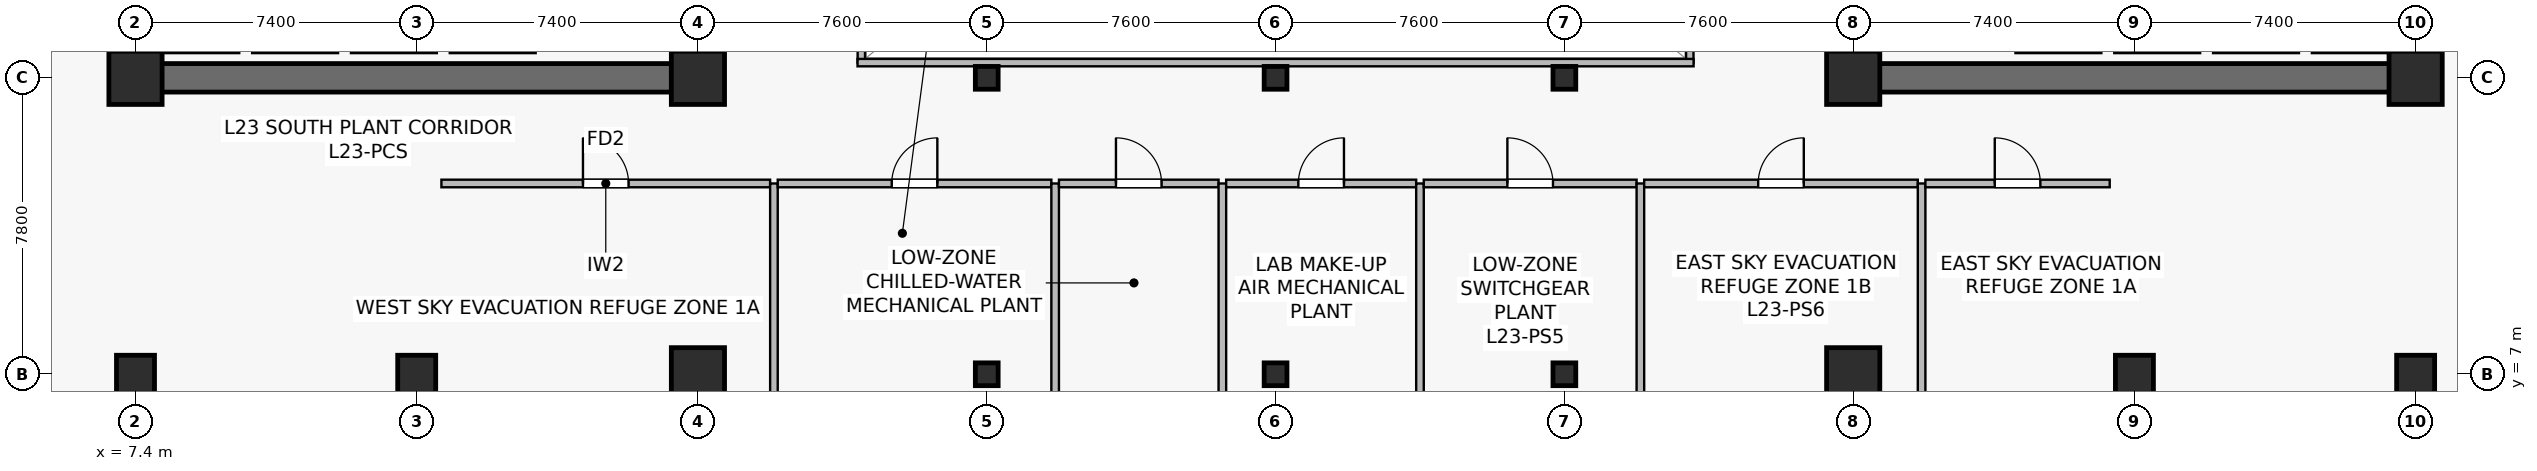
"""IFC4 building model, lengths in metres.
Left out: names, types, materials, properties, quantities, classifications, styles, units other than length and angle.
Written with IfcOpenShell. Run it as: python <this file> out.ifc"""

import sys

from ifc_helpers import new_model, si_unit, direction, frame, frame_2d, origin, origin_2d, place, context, subcontext, project, spatial, rectangle, hollow_rectangle, extrude, source, transform, mapped, element, fill, save


model = new_model("IFC4")
c1 = context("Model", 3, precision=1e-05, world=origin(), true_north=direction((0.0, 1.0)))
c2 = subcontext(c1, "Body", "Model", "MODEL_VIEW")
j1 = project(units=[si_unit("LENGTHUNIT", "METRE"), si_unit("PLANEANGLEUNIT", "RADIAN")], contexts=[c1])
p1 = place(None, origin())
s1 = spatial("IfcSite", under=j1, at=p1, CompositionType="ELEMENT")
p2 = place(p1, origin())
s2 = spatial("IfcBuilding", under=s1, at=p2, CompositionType="ELEMENT")
p3 = place(p2, frame((0.0, 0.0, 94.9)))
s3 = spatial("IfcBuildingStorey", under=s2, at=p3, CompositionType="ELEMENT", Elevation=94.9)
p4 = place(p3, frame((7.025, 14.8, 0.0), z_axis=(0.0, 0.0, 1.0), x_axis=(1.0, 0.0, 0.0)))
e1 = element("IfcWall", 1, at=p4, inside=s3, PredefinedType="SHEAR", context=c2, shape_type="SweptSolid", body=[
    extrude(rectangle(XDim=15.55, YDim=0.75, at=frame_2d((7.775, 0.0))), origin(), (0.0, 0.0, 1.0), 5.09),
])
p5 = place(p3, frame((7.4, 15.175, 0.0), z_axis=(0.0, 0.0, 1.0), x_axis=(0.0, 1.0, 0.0)))
e2 = element("IfcWall", 2, at=p5, inside=s3, PredefinedType="SHEAR", context=c2, shape_type="SweptSolid", body=[
    extrude(rectangle(XDim=18.25, YDim=0.75, at=frame_2d((9.125, 0.0))), origin(), (0.0, 0.0, 1.0), 5.09),
])
p6 = place(p3, frame((22.2, 15.175, 0.0), z_axis=(0.0, 0.0, 1.0), x_axis=(0.0, 1.0, 0.0)))
e3 = element("IfcWall", 3, at=p6, inside=s3, PredefinedType="SHEAR", context=c2, shape_type="SweptSolid", body=[
    extrude(rectangle(XDim=18.25, YDim=0.75, at=frame_2d((9.125, 0.0))), origin(), (0.0, 0.0, 1.0), 5.09),
])
p7 = place(p6, frame((3.375, 0.0, 0.0)))
e4 = element("IfcOpeningElement", 4, at=p7, cuts=e3, PredefinedType="OPENING", context=c2, shape_type="SweptSolid", body=[
    extrude(rectangle(XDim=1.42, YDim=2.2, at=frame_2d((0.71, 1.1))), frame((0.0, 0.385, 0.0), z_axis=(0.0, -1.0, 0.0), x_axis=(1.0, 0.0, 0.0)), (0.0, 0.0, 1.0), 0.77),
])
p8 = place(p3, frame((52.225, 14.8, 0.0), z_axis=(0.0, 0.0, 1.0), x_axis=(1.0, 0.0, 0.0)))
e5 = element("IfcWall", 5, at=p8, inside=s3, PredefinedType="SHEAR", context=c2, shape_type="SweptSolid", body=[
    extrude(rectangle(XDim=15.55, YDim=0.75, at=frame_2d((7.775, 0.0))), origin(), (0.0, 0.0, 1.0), 5.09),
])
p9 = place(p3, frame((52.6, 15.175, 0.0), z_axis=(0.0, 0.0, 1.0), x_axis=(0.0, 1.0, 0.0)))
e6 = element("IfcWall", 6, at=p9, inside=s3, PredefinedType="SHEAR", context=c2, shape_type="SweptSolid", body=[
    extrude(rectangle(XDim=18.25, YDim=0.75, at=frame_2d((9.125, 0.0))), origin(), (0.0, 0.0, 1.0), 5.09),
])
p10 = place(p9, frame((3.375, 0.0, 0.0)))
e7 = element("IfcOpeningElement", 7, at=p10, cuts=e6, PredefinedType="OPENING", context=c2, shape_type="SweptSolid", body=[
    extrude(rectangle(XDim=1.42, YDim=2.2, at=frame_2d((0.71, 1.1))), frame((0.0, 0.385, 0.0), z_axis=(0.0, -1.0, 0.0), x_axis=(1.0, 0.0, 0.0)), (0.0, 0.0, 1.0), 0.77),
])
p11 = place(p3, frame((67.4, 15.175, 0.0), z_axis=(0.0, 0.0, 1.0), x_axis=(0.0, 1.0, 0.0)))
e8 = element("IfcWall", 8, at=p11, inside=s3, PredefinedType="SHEAR", context=c2, shape_type="SweptSolid", body=[
    extrude(rectangle(XDim=18.25, YDim=0.75, at=frame_2d((9.125, 0.0))), origin(), (0.0, 0.0, 1.0), 5.09),
])
m1 = source(origin(), c2, "Body", "SweptSolid", [
    extrude(rectangle(XDim=1.0, YDim=1.0, at=origin_2d()), origin(), (0.0, 0.0, 1.0), 5.4),
])
p12 = place(p3, frame((14.8, 7.0, 0.0), z_axis=(0.0, 0.0, 1.0), x_axis=(1.0, 0.0, 0.0)))
e9 = element("IfcColumn", 9, at=p12, inside=s3, PredefinedType="COLUMN", context=c2, shape_type="MappedRepresentation", body=[
    mapped(m1, transform((0.0, 0.0, 0.0), scale=1.0)),
])
m2 = source(origin(), c2, "Body", "SweptSolid", [
    extrude(rectangle(XDim=1.4, YDim=1.4, at=origin_2d()), origin(), (0.0, 0.0, 1.0), 5.4),
])
for number, where, z_axis, x_axis in (
    (10, (22.2, 7.0, 0.0), (0.0, 0.0, 1.0), (1.0, 0.0, 0.0)),
    (11, (7.4, 14.8, 0.0), (0.0, 0.0, 1.0), (1.0, 0.0, 0.0)),
    (12, (22.2, 14.8, 0.0), (0.0, 0.0, 1.0), (1.0, 0.0, 0.0)),
    (13, (52.6, 7.0, 0.0), (0.0, 0.0, 1.0), (1.0, 0.0, 0.0)),
):
    element("IfcColumn", number, at=place(p3, frame(where, z_axis=z_axis, x_axis=x_axis)), inside=s3, PredefinedType="COLUMN", context=c2, shape_type="MappedRepresentation", body=[
        mapped(m2, transform((0.0, 0.0, 0.0), scale=1.0)),
    ])
p13 = place(p3, frame((60.0, 7.0, 0.0), z_axis=(0.0, 0.0, 1.0), x_axis=(1.0, 0.0, 0.0)))
e14 = element("IfcColumn", 14, at=p13, inside=s3, PredefinedType="COLUMN", context=c2, shape_type="MappedRepresentation", body=[
    mapped(m1, transform((0.0, 0.0, 0.0), scale=1.0)),
])
for number, where, z_axis, x_axis in (
    (15, (52.6, 14.8, 0.0), (0.0, 0.0, 1.0), (1.0, 0.0, 0.0)),
    (16, (67.4, 14.8, 0.0), (0.0, 0.0, 1.0), (1.0, 0.0, 0.0)),
):
    element("IfcColumn", number, at=place(p3, frame(where, z_axis=z_axis, x_axis=x_axis)), inside=s3, PredefinedType="COLUMN", context=c2, shape_type="MappedRepresentation", body=[
        mapped(m2, transform((0.0, 0.0, 0.0), scale=1.0)),
    ])
for number, where, z_axis, x_axis in (
    (17, (7.4, 7.0, 0.0), (0.0, 0.0, 1.0), (1.0, 0.0, 0.0)),
    (18, (67.4, 7.0, 0.0), (0.0, 0.0, 1.0), (1.0, 0.0, 0.0)),
):
    element("IfcColumn", number, at=place(p3, frame(where, z_axis=z_axis, x_axis=x_axis)), inside=s3, PredefinedType="COLUMN", context=c2, shape_type="MappedRepresentation", body=[
        mapped(m1, transform((0.0, 0.0, 0.0), scale=1.0)),
    ])
m3 = source(origin(), c2, "Body", "SweptSolid", [
    extrude(hollow_rectangle(XDim=0.6, YDim=0.6, WallThickness=0.028, at=origin_2d()), origin(), (0.0, 0.0, 1.0), 5.4),
])
for number, where, z_axis, x_axis in (
    (19, (29.8, 7.0, 0.0), (0.0, 0.0, 1.0), (1.0, 0.0, 0.0)),
    (20, (29.8, 14.8, 0.0), (0.0, 0.0, 1.0), (1.0, 0.0, 0.0)),
    (21, (37.4, 7.0, 0.0), (0.0, 0.0, 1.0), (1.0, 0.0, 0.0)),
    (22, (37.4, 14.8, 0.0), (0.0, 0.0, 1.0), (1.0, 0.0, 0.0)),
    (23, (45.0, 7.0, 0.0), (0.0, 0.0, 1.0), (1.0, 0.0, 0.0)),
    (24, (45.0, 14.8, 0.0), (0.0, 0.0, 1.0), (1.0, 0.0, 0.0)),
):
    element("IfcColumn", number, at=place(p3, frame(where, z_axis=z_axis, x_axis=x_axis)), inside=s3, PredefinedType="COLUMN", context=c2, shape_type="MappedRepresentation", body=[
        mapped(m3, transform((0.0, 0.0, 0.0), scale=1.0)),
    ])
p14 = place(p3, frame((7.87, 15.55, 0.0), z_axis=(0.0, 0.0, 1.0), x_axis=(1.0, 0.0, 0.0)))
e25 = element("IfcWall", 25, at=p14, inside=s3, PredefinedType="SOLIDWALL", context=c2, shape_type="SweptSolid", body=[
    extrude(rectangle(XDim=2.26, YDim=0.2, at=frame_2d((1.13, 0.0))), origin(), (0.0, 0.0, 1.0), 5.09),
])
p15 = place(p3, frame((10.47, 15.55, 0.0), z_axis=(0.0, 0.0, 1.0), x_axis=(1.0, 0.0, 0.0)))
e26 = element("IfcWall", 26, at=p15, inside=s3, PredefinedType="SOLIDWALL", context=c2, shape_type="SweptSolid", body=[
    extrude(rectangle(XDim=2.26, YDim=0.2, at=frame_2d((1.13, 0.0))), origin(), (0.0, 0.0, 1.0), 5.09),
])
p16 = place(p3, frame((13.07, 15.55, 0.0), z_axis=(0.0, 0.0, 1.0), x_axis=(1.0, 0.0, 0.0)))
e27 = element("IfcWall", 27, at=p16, inside=s3, PredefinedType="SOLIDWALL", context=c2, shape_type="SweptSolid", body=[
    extrude(rectangle(XDim=2.26, YDim=0.2, at=frame_2d((1.13, 0.0))), origin(), (0.0, 0.0, 1.0), 4.425),
])
for number, where, z_axis, x_axis in (
    (28, (15.67, 15.55, 0.0), (0.0, 0.0, 1.0), (1.0, 0.0, 0.0)),
    (29, (64.67, 15.55, 0.0), (0.0, 0.0, 1.0), (1.0, 0.0, 0.0)),
    (30, (62.07, 15.55, 0.0), (0.0, 0.0, 1.0), (1.0, 0.0, 0.0)),
):
    element("IfcWall", number, at=place(p3, frame(where, z_axis=z_axis, x_axis=x_axis)), inside=s3, PredefinedType="SOLIDWALL", context=c2, shape_type="SweptSolid", body=[
        extrude(rectangle(XDim=2.26, YDim=0.2, at=frame_2d((1.13, 0.0))), origin(), (0.0, 0.0, 1.0), 5.09),
    ])
p17 = place(p3, frame((59.47, 15.55, 0.0), z_axis=(0.0, 0.0, 1.0), x_axis=(1.0, 0.0, 0.0)))
e31 = element("IfcWall", 31, at=p17, inside=s3, PredefinedType="SOLIDWALL", context=c2, shape_type="SweptSolid", body=[
    extrude(rectangle(XDim=2.26, YDim=0.2, at=frame_2d((1.13, 0.0))), origin(), (0.0, 0.0, 1.0), 4.425),
])
p18 = place(p3, frame((56.87, 15.55, 0.0), z_axis=(0.0, 0.0, 1.0), x_axis=(1.0, 0.0, 0.0)))
e32 = element("IfcWall", 32, at=p18, inside=s3, PredefinedType="SOLIDWALL", context=c2, shape_type="SweptSolid", body=[
    extrude(rectangle(XDim=2.26, YDim=0.2, at=frame_2d((1.13, 0.0))), origin(), (0.0, 0.0, 1.0), 5.09),
])
p19 = place(p3, frame((26.5, 15.2, 0.0), z_axis=(0.0, 0.0, 1.0), x_axis=(0.0, 1.0, 0.0)))
e33 = element("IfcWall", 33, at=p19, inside=s3, PredefinedType="SOLIDWALL", context=c2, shape_type="SweptSolid", body=[
    extrude(rectangle(XDim=18.2, YDim=0.195, at=frame_2d((9.1, 0.0))), origin(), (0.0, 0.0, 1.0), 5.09),
])
p20 = place(p19, frame((1.8, 0.0, 0.9)))
e34 = element("IfcOpeningElement", 34, at=p20, cuts=e33, PredefinedType="OPENING", context=c2, shape_type="SweptSolid", body=[
    extrude(rectangle(XDim=1.2, YDim=1.35, at=frame_2d((0.6, 0.675))), frame((0.0, 0.107, 0.0), z_axis=(0.0, -1.0, 0.0), x_axis=(1.0, 0.0, 0.0)), (0.0, 0.0, 1.0), 0.215),
])
p21 = place(p19, frame((13.2, 0.0, 0.9)))
e35 = element("IfcOpeningElement", 35, at=p21, cuts=e33, PredefinedType="OPENING", context=c2, shape_type="SweptSolid", body=[
    extrude(rectangle(XDim=1.2, YDim=1.35, at=frame_2d((0.6, 0.675))), frame((0.0, 0.107, 0.0), z_axis=(0.0, -1.0, 0.0), x_axis=(1.0, 0.0, 0.0)), (0.0, 0.0, 1.0), 0.215),
])
p22 = place(p3, frame((48.3, 15.2, 0.0), z_axis=(0.0, 0.0, 1.0), x_axis=(0.0, 1.0, 0.0)))
e36 = element("IfcWall", 36, at=p22, inside=s3, PredefinedType="SOLIDWALL", context=c2, shape_type="SweptSolid", body=[
    extrude(rectangle(XDim=18.2, YDim=0.195, at=frame_2d((9.1, 0.0))), origin(), (0.0, 0.0, 1.0), 5.09),
])
p23 = place(p22, frame((1.8, 0.0, 0.9)))
e37 = element("IfcOpeningElement", 37, at=p23, cuts=e36, PredefinedType="OPENING", context=c2, shape_type="SweptSolid", body=[
    extrude(rectangle(XDim=1.2, YDim=1.35, at=frame_2d((0.6, 0.675))), frame((0.0, 0.107, 0.0), z_axis=(0.0, -1.0, 0.0), x_axis=(1.0, 0.0, 0.0)), (0.0, 0.0, 1.0), 0.215),
])
p24 = place(p22, frame((13.2, 0.0, 0.9)))
e38 = element("IfcOpeningElement", 38, at=p24, cuts=e36, PredefinedType="OPENING", context=c2, shape_type="SweptSolid", body=[
    extrude(rectangle(XDim=1.2, YDim=1.35, at=frame_2d((0.6, 0.675))), frame((0.0, 0.107, 0.0), z_axis=(0.0, -1.0, 0.0), x_axis=(1.0, 0.0, 0.0)), (0.0, 0.0, 1.0), 0.215),
])
p25 = place(p3, frame((26.4, 15.2, 0.0), z_axis=(0.0, 0.0, 1.0), x_axis=(1.0, 0.0, 0.0)))
e39 = element("IfcWall", 39, at=p25, inside=s3, PredefinedType="SOLIDWALL", context=c2, shape_type="SweptSolid", body=[
    extrude(rectangle(XDim=22.0, YDim=0.195, at=frame_2d((11.0, 0.0))), origin(), (0.0, 0.0, 1.0), 5.09),
])
p26 = place(p3, frame((15.45, 12.02, 0.0), z_axis=(0.0, 0.0, 1.0), x_axis=(1.0, 0.0, 0.0)))
e40 = element("IfcWall", 40, at=p26, inside=s3, PredefinedType="SOLIDWALL", context=c2, shape_type="SweptSolid", body=[
    extrude(rectangle(XDim=8.65, YDim=0.2, at=frame_2d((4.325, 0.0))), origin(), (0.0, 0.0, 1.0), 4.425),
])
p27 = place(p26, frame((3.725, 0.0, 0.0)))
e41 = element("IfcOpeningElement", 41, at=p27, cuts=e40, PredefinedType="OPENING", context=c2, shape_type="SweptSolid", body=[
    extrude(rectangle(XDim=1.2, YDim=2.16, at=frame_2d((0.6, 1.08))), frame((0.0, 0.11, 0.0), z_axis=(0.0, -1.0, 0.0), x_axis=(1.0, 0.0, 0.0)), (0.0, 0.0, 1.0), 0.22),
])
p28 = place(p3, frame((24.2, 0.11, 0.0), z_axis=(0.0, 0.0, 1.0), x_axis=(0.0, 1.0, 0.0)))
e42 = element("IfcWall", 42, at=p28, inside=s3, PredefinedType="SOLIDWALL", context=c2, shape_type="SweptSolid", body=[
    extrude(rectangle(XDim=11.91, YDim=0.2, at=frame_2d((5.955, 0.0))), origin(), (0.0, 0.0, 1.0), 4.325),
])
p29 = place(p3, frame((24.3, 12.02, 0.0), z_axis=(0.0, 0.0, 1.0), x_axis=(1.0, 0.0, 0.0)))
e43 = element("IfcWall", 43, at=p29, inside=s3, PredefinedType="SOLIDWALL", context=c2, shape_type="SweptSolid", body=[
    extrude(rectangle(XDim=7.2, YDim=0.2, at=frame_2d((3.6, 0.0))), origin(), (0.0, 0.0, 1.0), 4.425),
])
p30 = place(p29, frame((3.0, 0.0, 0.0)))
e44 = element("IfcOpeningElement", 44, at=p30, cuts=e43, PredefinedType="OPENING", context=c2, shape_type="SweptSolid", body=[
    extrude(rectangle(XDim=1.2, YDim=2.16, at=frame_2d((0.6, 1.08))), frame((0.0, 0.11, 0.0), z_axis=(0.0, -1.0, 0.0), x_axis=(1.0, 0.0, 0.0)), (0.0, 0.0, 1.0), 0.22),
])
p31 = place(p3, frame((31.6, 0.11, 0.0), z_axis=(0.0, 0.0, 1.0), x_axis=(0.0, 1.0, 0.0)))
e45 = element("IfcWall", 45, at=p31, inside=s3, PredefinedType="SOLIDWALL", context=c2, shape_type="SweptSolid", body=[
    extrude(rectangle(XDim=11.91, YDim=0.2, at=frame_2d((5.955, 0.0))), origin(), (0.0, 0.0, 1.0), 4.325),
])
p32 = place(p3, frame((31.7, 12.02, 0.0), z_axis=(0.0, 0.0, 1.0), x_axis=(1.0, 0.0, 0.0)))
e46 = element("IfcWall", 46, at=p32, inside=s3, PredefinedType="SOLIDWALL", context=c2, shape_type="SweptSolid", body=[
    extrude(rectangle(XDim=4.2, YDim=0.2, at=frame_2d((2.1, 0.0))), origin(), (0.0, 0.0, 1.0), 4.725),
])
p33 = place(p32, frame((1.5, 0.0, 0.0)))
e47 = element("IfcOpeningElement", 47, at=p33, cuts=e46, PredefinedType="OPENING", context=c2, shape_type="SweptSolid", body=[
    extrude(rectangle(XDim=1.2, YDim=2.16, at=frame_2d((0.6, 1.08))), frame((0.0, 0.11, 0.0), z_axis=(0.0, -1.0, 0.0), x_axis=(1.0, 0.0, 0.0)), (0.0, 0.0, 1.0), 0.22),
])
p34 = place(p3, frame((36.0, 0.11, 0.0), z_axis=(0.0, 0.0, 1.0), x_axis=(0.0, 1.0, 0.0)))
e48 = element("IfcWall", 48, at=p34, inside=s3, PredefinedType="SOLIDWALL", context=c2, shape_type="SweptSolid", body=[
    extrude(rectangle(XDim=11.91, YDim=0.2, at=frame_2d((5.955, 0.0))), origin(), (0.0, 0.0, 1.0), 4.325),
])
p35 = place(p3, frame((36.1, 12.02, 0.0), z_axis=(0.0, 0.0, 1.0), x_axis=(1.0, 0.0, 0.0)))
e49 = element("IfcWall", 49, at=p35, inside=s3, PredefinedType="SOLIDWALL", context=c2, shape_type="SweptSolid", body=[
    extrude(rectangle(XDim=5.0, YDim=0.2, at=frame_2d((2.5, 0.0))), origin(), (0.0, 0.0, 1.0), 4.425),
])
p36 = place(p35, frame((1.9, 0.0, 0.0)))
e50 = element("IfcOpeningElement", 50, at=p36, cuts=e49, PredefinedType="OPENING", context=c2, shape_type="SweptSolid", body=[
    extrude(rectangle(XDim=1.2, YDim=2.16, at=frame_2d((0.6, 1.08))), frame((0.0, 0.11, 0.0), z_axis=(0.0, -1.0, 0.0), x_axis=(1.0, 0.0, 0.0)), (0.0, 0.0, 1.0), 0.22),
])
p37 = place(p3, frame((41.2, 0.11, 0.0), z_axis=(0.0, 0.0, 1.0), x_axis=(0.0, 1.0, 0.0)))
e51 = element("IfcWall", 51, at=p37, inside=s3, PredefinedType="SOLIDWALL", context=c2, shape_type="SweptSolid", body=[
    extrude(rectangle(XDim=11.91, YDim=0.2, at=frame_2d((5.955, 0.0))), origin(), (0.0, 0.0, 1.0), 4.325),
])
p38 = place(p3, frame((41.3, 12.02, 0.0), z_axis=(0.0, 0.0, 1.0), x_axis=(1.0, 0.0, 0.0)))
e52 = element("IfcWall", 52, at=p38, inside=s3, PredefinedType="SOLIDWALL", context=c2, shape_type="SweptSolid", body=[
    extrude(rectangle(XDim=5.6, YDim=0.2, at=frame_2d((2.8, 0.0))), origin(), (0.0, 0.0, 1.0), 4.425),
])
p39 = place(p38, frame((2.2, 0.0, 0.0)))
e53 = element("IfcOpeningElement", 53, at=p39, cuts=e52, PredefinedType="OPENING", context=c2, shape_type="SweptSolid", body=[
    extrude(rectangle(XDim=1.2, YDim=2.16, at=frame_2d((0.6, 1.08))), frame((0.0, 0.11, 0.0), z_axis=(0.0, -1.0, 0.0), x_axis=(1.0, 0.0, 0.0)), (0.0, 0.0, 1.0), 0.22),
])
p40 = place(p3, frame((47.0, 0.11, 0.0), z_axis=(0.0, 0.0, 1.0), x_axis=(0.0, 1.0, 0.0)))
e54 = element("IfcWall", 54, at=p40, inside=s3, PredefinedType="SOLIDWALL", context=c2, shape_type="SweptSolid", body=[
    extrude(rectangle(XDim=11.91, YDim=0.2, at=frame_2d((5.955, 0.0))), origin(), (0.0, 0.0, 1.0), 4.325),
])
p41 = place(p3, frame((47.1, 12.02, 0.0), z_axis=(0.0, 0.0, 1.0), x_axis=(1.0, 0.0, 0.0)))
e55 = element("IfcWall", 55, at=p41, inside=s3, PredefinedType="SOLIDWALL", context=c2, shape_type="SweptSolid", body=[
    extrude(rectangle(XDim=7.2, YDim=0.2, at=frame_2d((3.6, 0.0))), origin(), (0.0, 0.0, 1.0), 4.425),
])
p42 = place(p41, frame((3.0, 0.0, 0.0)))
e56 = element("IfcOpeningElement", 56, at=p42, cuts=e55, PredefinedType="OPENING", context=c2, shape_type="SweptSolid", body=[
    extrude(rectangle(XDim=1.2, YDim=2.16, at=frame_2d((0.6, 1.08))), frame((0.0, 0.11, 0.0), z_axis=(0.0, -1.0, 0.0), x_axis=(1.0, 0.0, 0.0)), (0.0, 0.0, 1.0), 0.22),
])
p43 = place(p3, frame((54.4, 0.11, 0.0), z_axis=(0.0, 0.0, 1.0), x_axis=(0.0, 1.0, 0.0)))
e57 = element("IfcWall", 57, at=p43, inside=s3, PredefinedType="SOLIDWALL", context=c2, shape_type="SweptSolid", body=[
    extrude(rectangle(XDim=11.91, YDim=0.2, at=frame_2d((5.955, 0.0))), origin(), (0.0, 0.0, 1.0), 4.225),
])
p44 = place(p3, frame((54.5, 12.02, 0.0), z_axis=(0.0, 0.0, 1.0), x_axis=(1.0, 0.0, 0.0)))
e58 = element("IfcWall", 58, at=p44, inside=s3, PredefinedType="SOLIDWALL", context=c2, shape_type="SweptSolid", body=[
    extrude(rectangle(XDim=4.85, YDim=0.2, at=frame_2d((2.425, 0.0))), origin(), (0.0, 0.0, 1.0), 4.725),
])
p45 = place(p44, frame((1.825, 0.0, 0.0)))
e59 = element("IfcOpeningElement", 59, at=p45, cuts=e58, PredefinedType="OPENING", context=c2, shape_type="SweptSolid", body=[
    extrude(rectangle(XDim=1.2, YDim=2.16, at=frame_2d((0.6, 1.08))), frame((0.0, 0.11, 0.0), z_axis=(0.0, -1.0, 0.0), x_axis=(1.0, 0.0, 0.0)), (0.0, 0.0, 1.0), 0.22),
])
m4 = source(origin(), c2, "Body", "SweptSolid", [
    extrude(rectangle(XDim=1.2, YDim=2.16, at=frame_2d((0.6, 1.08))), frame((0.0, 0.025, 0.0), z_axis=(0.0, -1.0, 0.0), x_axis=(1.0, 0.0, 0.0)), (0.0, 0.0, 1.0), 0.05),
])
p46 = place(p27, origin())
e60 = element("IfcDoor", 60, at=p46, inside=s3, OperationType="SINGLE_SWING_LEFT", PredefinedType="DOOR", context=c2, shape_type="MappedRepresentation", body=[
    mapped(m4, transform((0.0, 0.0, 0.0), scale=1.0)),
])
fill(e41, e60)
p47 = place(p30, origin())
e61 = element("IfcDoor", 61, at=p47, inside=s3, OperationType="SINGLE_SWING_RIGHT", PredefinedType="DOOR", context=c2, shape_type="MappedRepresentation", body=[
    mapped(m4, transform((0.0, 0.0, 0.0), scale=1.0)),
])
fill(e44, e61)
p48 = place(p33, origin())
e62 = element("IfcDoor", 62, at=p48, inside=s3, OperationType="SINGLE_SWING_LEFT", PredefinedType="DOOR", context=c2, shape_type="MappedRepresentation", body=[
    mapped(m4, transform((0.0, 0.0, 0.0), scale=1.0)),
])
fill(e47, e62)
p49 = place(p36, origin())
e63 = element("IfcDoor", 63, at=p49, inside=s3, OperationType="SINGLE_SWING_RIGHT", PredefinedType="DOOR", context=c2, shape_type="MappedRepresentation", body=[
    mapped(m4, transform((0.0, 0.0, 0.0), scale=1.0)),
])
fill(e50, e63)
p50 = place(p39, origin())
e64 = element("IfcDoor", 64, at=p50, inside=s3, OperationType="SINGLE_SWING_LEFT", PredefinedType="DOOR", context=c2, shape_type="MappedRepresentation", body=[
    mapped(m4, transform((0.0, 0.0, 0.0), scale=1.0)),
])
fill(e53, e64)
p51 = place(p42, origin())
e65 = element("IfcDoor", 65, at=p51, inside=s3, OperationType="SINGLE_SWING_RIGHT", PredefinedType="DOOR", context=c2, shape_type="MappedRepresentation", body=[
    mapped(m4, transform((0.0, 0.0, 0.0), scale=1.0)),
])
fill(e56, e65)
p52 = place(p45, origin())
e66 = element("IfcDoor", 66, at=p52, inside=s3, OperationType="SINGLE_SWING_LEFT", PredefinedType="DOOR", context=c2, shape_type="MappedRepresentation", body=[
    mapped(m4, transform((0.0, 0.0, 0.0), scale=1.0)),
])
fill(e59, e66)
save(model, sys.argv[1])
